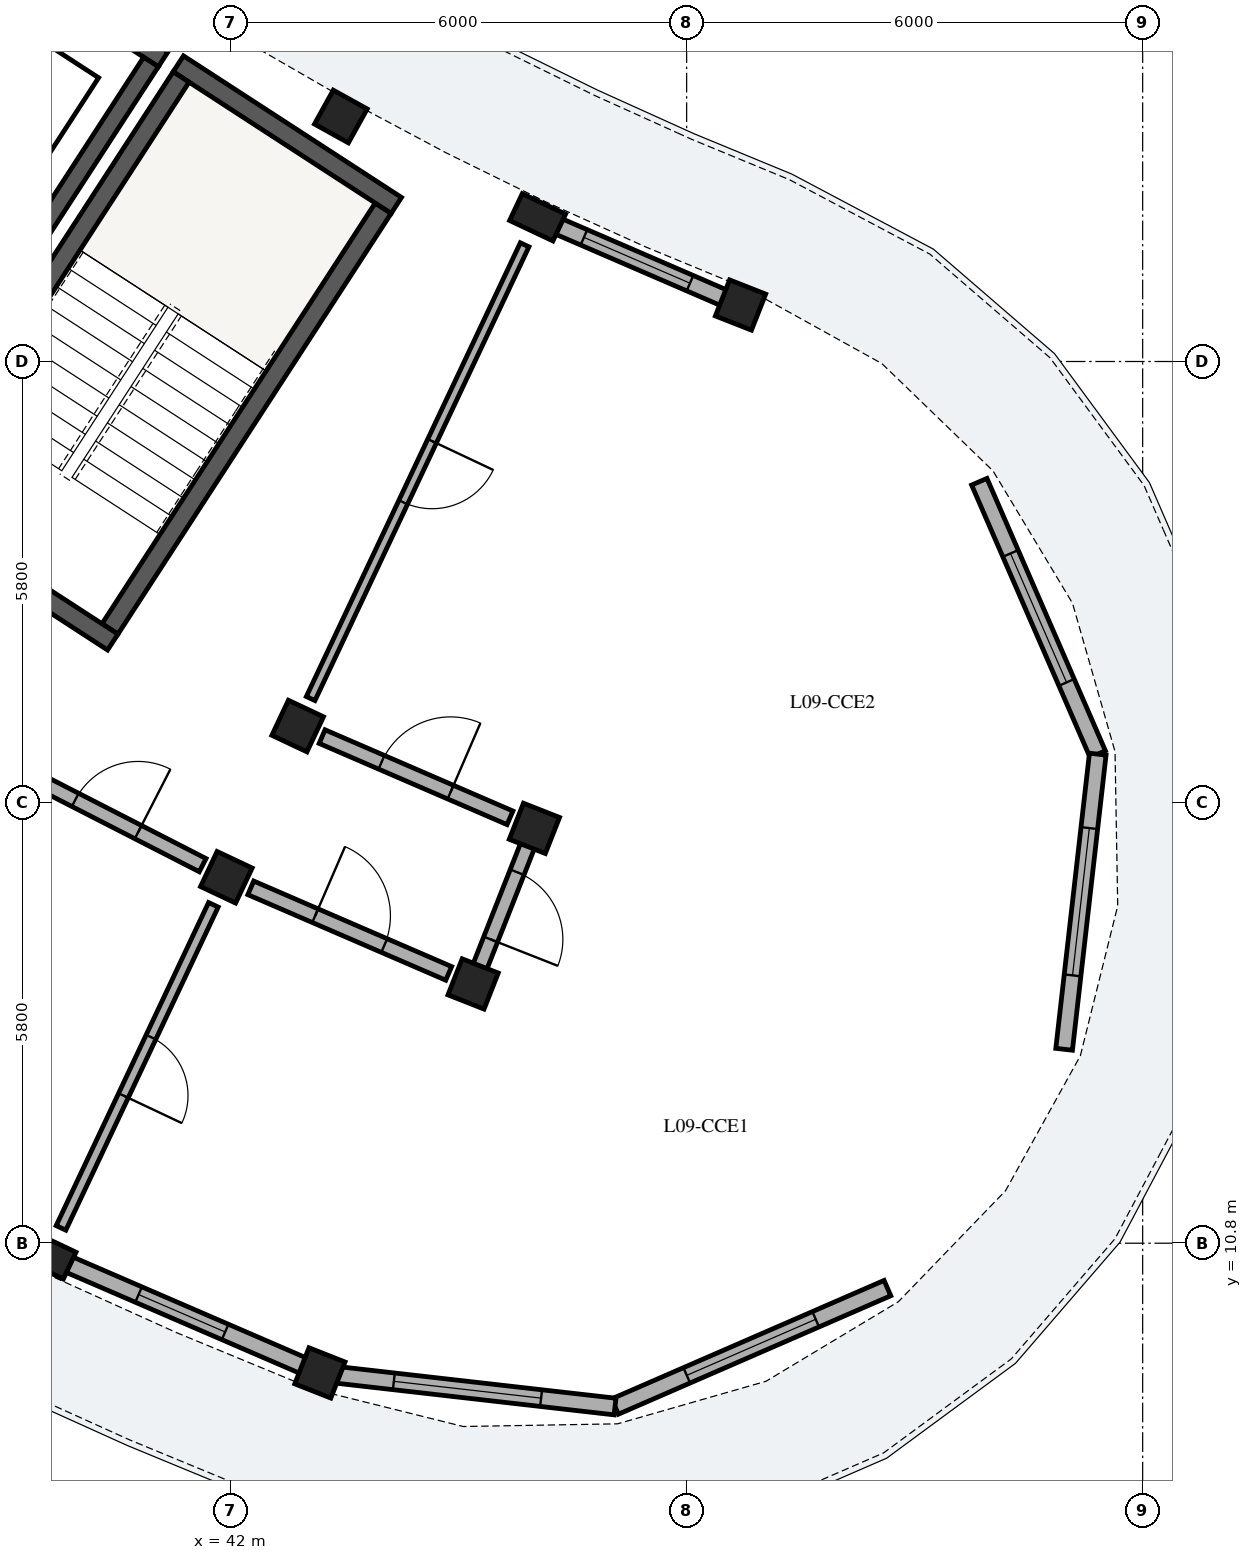
"""IFC4 building model, lengths in metres.
Left out: names, types, materials, properties, quantities, classifications, styles, units other than length and angle.
Written with IfcOpenShell. Run it as: python <this file> out.ifc"""

import sys

from ifc_helpers import new_model, si_unit, direction, frame, frame_2d, origin, origin_2d, place, context, subcontext, project, spatial, rectangle, extrude, element, fill, save


model = new_model("IFC4")
c1 = context("Model", 3, precision=1e-05, world=origin(), true_north=direction((0.0, 1.0)))
c2 = subcontext(c1, "Body", "Model", "MODEL_VIEW")
j1 = project(units=[si_unit("LENGTHUNIT", "METRE"), si_unit("PLANEANGLEUNIT", "RADIAN")], contexts=[c1])
p1 = place(None, origin())
s1 = spatial("IfcSite", under=j1, at=p1, CompositionType="ELEMENT")
p2 = place(p1, origin())
s2 = spatial("IfcBuilding", under=s1, at=p2, CompositionType="ELEMENT")
p3 = place(p2, frame((0.0, 0.0, 32.36)))
s3 = spatial("IfcBuildingStorey", under=s2, at=p3, CompositionType="ELEMENT", Elevation=32.36)
p4 = place(p3, frame((40.413, 18.882, 0.0), z_axis=(0.0, 0.0, 1.0), x_axis=(0.544629435258, 0.838676802022, 0.0)))
e1 = element("IfcWall", 1, at=p4, inside=s3, PredefinedType="SHEAR", context=c2, shape_type="SweptSolid", body=[
    extrude(rectangle(XDim=6.6, YDim=0.25, at=frame_2d((3.3, 0.0))), origin(), (0.0, 0.0, 1.0), 3.11),
])
p5 = place(p3, frame((44.18, 24.454, 0.0), z_axis=(0.0, 0.0, 1.0), x_axis=(-0.838699580527, 0.544594356953, 0.0)))
e2 = element("IfcWall", 2, at=p5, inside=s3, PredefinedType="SHEAR", context=c2, shape_type="SweptSolid", body=[
    extrude(rectangle(XDim=3.42, YDim=0.25, at=frame_2d((1.71, 0.0))), origin(), (0.0, 0.0, 1.0), 3.11),
])
p6 = place(p3, frame((40.449, 18.709, 0.0), z_axis=(0.0, 0.0, 1.0), x_axis=(-0.838678407117, 0.544626963559, 0.0)))
e3 = element("IfcWall", 3, at=p6, inside=s3, PredefinedType="SHEAR", context=c2, shape_type="SweptSolid", body=[
    extrude(rectangle(XDim=3.42, YDim=0.25, at=frame_2d((1.71, 0.0))), origin(), (0.0, 0.0, 1.0), 3.11),
])
p7 = place(p3, frame((37.754, 20.608, 0.0), z_axis=(0.0, 0.0, 1.0), x_axis=(0.544655453679, 0.838659905312, 0.0)))
e4 = element("IfcWall", 4, at=p7, inside=s3, PredefinedType="SHEAR", context=c2, shape_type="SweptSolid", body=[
    extrude(rectangle(XDim=6.6, YDim=0.25, at=frame_2d((3.3, 0.0))), origin(), (0.0, 0.0, 1.0), 3.11),
])
p8 = place(p7, frame((0.22, 0.0, 0.0)))
e5 = element("IfcOpeningElement", 5, at=p8, cuts=e4, PredefinedType="OPENING", context=c2, shape_type="SweptSolid", body=[
    extrude(rectangle(XDim=1.05, YDim=2.15, at=frame_2d((0.525, 1.075))), frame((0.0, 0.135, 0.0), z_axis=(0.0, -1.0, 0.0), x_axis=(1.0, 0.0, 0.0)), (0.0, 0.0, 1.0), 0.27),
])
p9 = place(p3, frame((41.112, 26.375, 0.0), z_axis=(0.0, 0.0, 1.0), x_axis=(-0.838638623546, 0.544688221919, 0.0)))
e6 = element("IfcWall", 6, at=p9, inside=s3, PredefinedType="SHEAR", context=c2, shape_type="SweptSolid", body=[
    extrude(rectangle(XDim=3.26, YDim=0.23, at=frame_2d((1.63, 0.0))), origin(), (0.0, 0.0, 1.0), 3.11),
])
p10 = place(p3, frame((39.482, 24.077, 0.0), z_axis=(0.0, 0.0, 1.0), x_axis=(0.544686387605, 0.838639814913, 0.0)))
e7 = element("IfcWall", 7, at=p10, inside=s3, PredefinedType="SHEAR", context=c2, shape_type="SweptSolid", body=[
    extrude(rectangle(XDim=2.7, YDim=0.23, at=frame_2d((1.35, 0.0))), origin(), (0.0, 0.0, 1.0), 3.11),
])
p11 = place(p3, frame((43.45, 25.623, 0.0), z_axis=(0.0, 0.0, 1.0), x_axis=(-0.484809620246, -0.874619707139, 0.0)))
e8 = element("IfcColumn", 8, at=p11, inside=s3, PredefinedType="COLUMN", context=c2, shape_type="SweptSolid", body=[
    extrude(rectangle(XDim=0.51, YDim=0.51, at=origin_2d()), origin(), (0.0, 0.0, 1.0), 3.115),
])
p12 = place(p3, frame((46.039, 24.297, 0.0), z_axis=(0.0, 0.0, 1.0), x_axis=(-0.426568739901, -0.904455145454, 0.0)))
e9 = element("IfcColumn", 9, at=p12, inside=s3, PredefinedType="PILASTER", context=c2, shape_type="SweptSolid", body=[
    extrude(rectangle(XDim=0.39, YDim=0.63, at=origin_2d()), origin(), (0.0, 0.0, 1.0), 3.115),
])
for number, where, z_axis, x_axis in (
    (10, (42.882, 17.604, 0.0), (0.0, 0.0, 1.0), (-0.427, -0.904, 0.0)),
    (11, (41.944, 15.614, 0.0), (0.0, 0.0, 1.0), (-0.427, -0.904, 0.0)),
):
    element("IfcColumn", number, at=place(p3, frame(where, z_axis=z_axis, x_axis=x_axis)), inside=s3, PredefinedType="COLUMN", context=c2, shape_type="SweptSolid", body=[
        extrude(rectangle(XDim=0.51, YDim=0.51, at=origin_2d()), origin(), (0.0, 0.0, 1.0), 3.115),
    ])
p13 = place(p3, frame((39.598, 10.64, 0.0), z_axis=(0.0, 0.0, 1.0), x_axis=(-0.426568739901, -0.904455145454, 0.0)))
e12 = element("IfcColumn", 12, at=p13, inside=s3, PredefinedType="PILASTER", context=c2, shape_type="SweptSolid", body=[
    extrude(rectangle(XDim=0.39, YDim=0.63, at=origin_2d()), origin(), (0.0, 0.0, 1.0), 3.115),
])
for number, where, z_axis, x_axis in (
    (13, (48.709, 23.143, 0.0), (0.0, 0.0, 1.0), (-0.367, -0.93, 0.0)),
    (14, (45.997, 16.258, 0.0), (0.0, 0.0, 1.0), (-0.367, -0.93, 0.0)),
    (15, (45.191, 14.211, 0.0), (0.0, 0.0, 1.0), (-0.367, -0.93, 0.0)),
    (16, (43.175, 9.094, 0.0), (0.0, 0.0, 1.0), (-0.367, -0.93, 0.0)),
):
    element("IfcColumn", number, at=place(p3, frame(where, z_axis=z_axis, x_axis=x_axis)), inside=s3, PredefinedType="COLUMN", context=c2, shape_type="SweptSolid", body=[
        extrude(rectangle(XDim=0.51, YDim=0.51, at=origin_2d()), origin(), (0.0, 0.0, 1.0), 3.115),
    ])
p14 = place(p3, frame((39.749, 10.574, 0.0), z_axis=(0.0, 0.0, 1.0), x_axis=(0.917923514364, -0.396757384024, 0.0)))
e17 = element("IfcWall", 17, at=p14, inside=s3, PredefinedType="SOLIDWALL", context=c2, shape_type="SweptSolid", body=[
    extrude(rectangle(XDim=3.507, YDim=0.22, at=frame_2d((1.753, 0.0))), origin(), (0.0, 0.0, 1.0), 2.355),
])
p15 = place(p14, frame((1.133, 0.0, 0.55)))
e18 = element("IfcOpeningElement", 18, at=p15, cuts=e17, PredefinedType="OPENING", context=c2, shape_type="SweptSolid", body=[
    extrude(rectangle(XDim=1.24, YDim=1.535, at=frame_2d((0.62, 0.768))), frame((0.0, 0.12, 0.0), z_axis=(0.0, -1.0, 0.0), x_axis=(1.0, 0.0, 0.0)), (0.0, 0.0, 1.0), 0.24),
])
p16 = place(p3, frame((46.19, 24.231, 0.0), z_axis=(0.0, 0.0, 1.0), x_axis=(0.917932416464, -0.396736787813, 0.0)))
e19 = element("IfcWall", 19, at=p16, inside=s3, PredefinedType="SOLIDWALL", context=c2, shape_type="SweptSolid", body=[
    extrude(rectangle(XDim=2.519, YDim=0.22, at=frame_2d((1.259, 0.0))), origin(), (0.0, 0.0, 1.0), 2.355),
])
p17 = place(p16, frame((0.5, 0.0, 0.55)))
e20 = element("IfcOpeningElement", 20, at=p17, cuts=e19, PredefinedType="OPENING", context=c2, shape_type="SweptSolid", body=[
    extrude(rectangle(XDim=1.52, YDim=1.485, at=frame_2d((0.76, 0.743))), frame((0.0, 0.12, 0.0), z_axis=(0.0, -1.0, 0.0), x_axis=(1.0, 0.0, 0.0)), (0.0, 0.0, 1.0), 0.24),
])
p18 = place(p3, frame((51.851, 20.818, 0.0), z_axis=(0.0, 0.0, 1.0), x_axis=(0.398723827264, -0.917071049359, 0.0)))
e21 = element("IfcWall", 21, at=p18, inside=s3, PredefinedType="SOLIDWALL", context=c2, shape_type="SweptSolid", body=[
    extrude(rectangle(XDim=3.908, YDim=0.22, at=frame_2d((1.954, 0.0))), origin(), (0.0, 0.0, 1.0), 2.355),
])
p19 = place(p18, frame((1.029, 0.0, 0.4)))
e22 = element("IfcOpeningElement", 22, at=p19, cuts=e21, PredefinedType="OPENING", context=c2, shape_type="SweptSolid", body=[
    extrude(rectangle(XDim=1.85, YDim=1.72, at=frame_2d((0.925, 0.86))), frame((0.0, 0.12, 0.0), z_axis=(0.0, -1.0, 0.0), x_axis=(1.0, 0.0, 0.0)), (0.0, 0.0, 1.0), 0.24),
])
p20 = place(p3, frame((53.409, 17.234, 0.0), z_axis=(0.0, 0.0, 1.0), x_axis=(-0.113201245525, -0.993572079928, 0.0)))
e23 = element("IfcWall", 23, at=p20, inside=s3, PredefinedType="SOLIDWALL", context=c2, shape_type="SweptSolid", body=[
    extrude(rectangle(XDim=3.908, YDim=0.22, at=frame_2d((1.954, 0.0))), origin(), (0.0, 0.0, 1.0), 2.355),
])
p21 = place(p20, frame((0.979, 0.0, 0.4)))
e24 = element("IfcOpeningElement", 24, at=p21, cuts=e23, PredefinedType="OPENING", context=c2, shape_type="SweptSolid", body=[
    extrude(rectangle(XDim=1.95, YDim=1.78, at=frame_2d((0.975, 0.89))), frame((0.0, 0.12, 0.0), z_axis=(0.0, -1.0, 0.0), x_axis=(1.0, 0.0, 0.0)), (0.0, 0.0, 1.0), 0.24),
])
p22 = place(p3, frame((50.642, 10.209, 0.0), z_axis=(0.0, 0.0, 1.0), x_axis=(-0.917061117534, -0.398746669838, 0.0)))
e25 = element("IfcWall", 25, at=p22, inside=s3, PredefinedType="SOLIDWALL", context=c2, shape_type="SweptSolid", body=[
    extrude(rectangle(XDim=3.908, YDim=0.22, at=frame_2d((1.954, 0.0))), origin(), (0.0, 0.0, 1.0), 2.355),
])
p23 = place(p22, frame((1.029, 0.0, 0.4)))
e26 = element("IfcOpeningElement", 26, at=p23, cuts=e25, PredefinedType="OPENING", context=c2, shape_type="SweptSolid", body=[
    extrude(rectangle(XDim=1.85, YDim=1.72, at=frame_2d((0.925, 0.86))), frame((0.0, 0.12, 0.0), z_axis=(0.0, -1.0, 0.0), x_axis=(1.0, 0.0, 0.0)), (0.0, 0.0, 1.0), 0.24),
])
p24 = place(p3, frame((47.058, 8.651, 0.0), z_axis=(0.0, 0.0, 1.0), x_axis=(-0.993565852845, 0.113255887533, 0.0)))
e27 = element("IfcWall", 27, at=p24, inside=s3, PredefinedType="SOLIDWALL", context=c2, shape_type="SweptSolid", body=[
    extrude(rectangle(XDim=3.908, YDim=0.22, at=frame_2d((1.954, 0.0))), origin(), (0.0, 0.0, 1.0), 2.355),
])
p25 = place(p24, frame((0.979, 0.0, 0.4)))
e28 = element("IfcOpeningElement", 28, at=p25, cuts=e27, PredefinedType="OPENING", context=c2, shape_type="SweptSolid", body=[
    extrude(rectangle(XDim=1.95, YDim=1.78, at=frame_2d((0.975, 0.89))), frame((0.0, 0.12, 0.0), z_axis=(0.0, -1.0, 0.0), x_axis=(1.0, 0.0, 0.0)), (0.0, 0.0, 1.0), 0.24),
])
p26 = place(p3, frame((39.107, 17.067, 0.0), z_axis=(0.0, 0.0, 1.0), x_axis=(0.890030590607, -0.45590080915, 0.0)))
e29 = element("IfcWall", 29, at=p26, inside=s3, PredefinedType="PARTITIONING", context=c2, shape_type="SweptSolid", body=[
    extrude(rectangle(XDim=2.837, YDim=0.195, at=frame_2d((1.418, 0.0))), origin(), (0.0, 0.0, 1.0), 2.37),
])
p27 = place(p26, frame((0.954, 0.0, 0.0)))
e30 = element("IfcOpeningElement", 30, at=p27, cuts=e29, PredefinedType="OPENING", context=c2, shape_type="SweptSolid", body=[
    extrude(rectangle(XDim=0.93, YDim=2.12, at=frame_2d((0.465, 1.06))), frame((0.0, 0.107, 0.0), z_axis=(0.0, -1.0, 0.0), x_axis=(1.0, 0.0, 0.0)), (0.0, 0.0, 1.0), 0.215),
])
p28 = place(p3, frame((41.773, 15.252, 0.0), z_axis=(0.0, 0.0, 1.0), x_axis=(-0.426567365945, -0.904455793453, 0.0)))
e31 = element("IfcWall", 31, at=p28, inside=s3, PredefinedType="PLUMBINGWALL", context=c2, shape_type="SweptSolid", body=[
    extrude(rectangle(XDim=4.7, YDim=0.14, at=frame_2d((2.35, 0.0))), origin(), (0.0, 0.0, 1.0), 2.37),
])
p29 = place(p28, frame((1.925, 0.0, 0.0)))
e32 = element("IfcOpeningElement", 32, at=p29, cuts=e31, PredefinedType="OPENING", context=c2, shape_type="SweptSolid", body=[
    extrude(rectangle(XDim=0.85, YDim=2.05, at=frame_2d((0.425, 1.025))), frame((0.0, 0.08, 0.0), z_axis=(0.0, -1.0, 0.0), x_axis=(1.0, 0.0, 0.0)), (0.0, 0.0, 1.0), 0.16),
])
p30 = place(p3, frame((45.868, 23.935, 0.0), z_axis=(0.0, 0.0, 1.0), x_axis=(-0.426573573579, -0.904452865728, 0.0)))
e33 = element("IfcWall", 33, at=p30, inside=s3, PredefinedType="PARTITIONING", context=c2, shape_type="SweptSolid", body=[
    extrude(rectangle(XDim=6.6, YDim=0.125, at=frame_2d((3.3, 0.0))), origin(), (0.0, 0.0, 1.0), 2.37),
])
p31 = place(p30, frame((2.855, 0.0, 0.0)))
e34 = element("IfcOpeningElement", 34, at=p31, cuts=e33, PredefinedType="OPENING", context=c2, shape_type="SweptSolid", body=[
    extrude(rectangle(XDim=0.89, YDim=2.1, at=frame_2d((0.445, 1.05))), frame((0.0, 0.073, 0.0), z_axis=(0.0, -1.0, 0.0), x_axis=(1.0, 0.0, 0.0)), (0.0, 0.0, 1.0), 0.145),
])
p32 = place(p3, frame((42.265, 15.475, 0.0), z_axis=(0.0, 0.0, 1.0), x_axis=(0.917943439406, -0.396711282991, 0.0)))
e35 = element("IfcWall", 35, at=p32, inside=s3, PredefinedType="PARTITIONING", context=c2, shape_type="SweptSolid", body=[
    extrude(rectangle(XDim=2.837, YDim=0.195, at=frame_2d((1.418, 0.0))), origin(), (0.0, 0.0, 1.0), 2.37),
])
p33 = place(p32, frame((0.924, 0.0, 0.0)))
e36 = element("IfcOpeningElement", 36, at=p33, cuts=e35, PredefinedType="OPENING", context=c2, shape_type="SweptSolid", body=[
    extrude(rectangle(XDim=0.99, YDim=2.16, at=frame_2d((0.495, 1.08))), frame((0.0, 0.107, 0.0), z_axis=(0.0, -1.0, 0.0), x_axis=(1.0, 0.0, 0.0)), (0.0, 0.0, 1.0), 0.215),
])
p34 = place(p3, frame((43.204, 17.465, 0.0), z_axis=(0.0, 0.0, 1.0), x_axis=(0.91793557165, -0.39672948756, 0.0)))
e37 = element("IfcWall", 37, at=p34, inside=s3, PredefinedType="PARTITIONING", context=c2, shape_type="SweptSolid", body=[
    extrude(rectangle(XDim=2.693, YDim=0.195, at=frame_2d((1.346, 0.0))), origin(), (0.0, 0.0, 1.0), 2.37),
])
p35 = place(p34, frame((0.852, 0.0, 0.0)))
e38 = element("IfcOpeningElement", 38, at=p35, cuts=e37, PredefinedType="OPENING", context=c2, shape_type="SweptSolid", body=[
    extrude(rectangle(XDim=0.99, YDim=2.16, at=frame_2d((0.495, 1.08))), frame((0.0, 0.107, 0.0), z_axis=(0.0, -1.0, 0.0), x_axis=(1.0, 0.0, 0.0)), (0.0, 0.0, 1.0), 0.215),
])
p36 = place(p3, frame((45.979, 16.211, 0.0), z_axis=(0.0, 0.0, 1.0), x_axis=(-0.366454372645, -0.930436022932, 0.0)))
e39 = element("IfcWall", 39, at=p36, inside=s3, PredefinedType="PARTITIONING", context=c2, shape_type="SweptSolid", body=[
    extrude(rectangle(XDim=2.1, YDim=0.195, at=frame_2d((1.05, 0.0))), origin(), (0.0, 0.0, 1.0), 2.37),
])
p37 = place(p36, frame((0.57, 0.0, 0.0)))
e40 = element("IfcOpeningElement", 40, at=p37, cuts=e39, PredefinedType="OPENING", context=c2, shape_type="SweptSolid", body=[
    extrude(rectangle(XDim=0.95, YDim=2.13, at=frame_2d((0.475, 1.065))), frame((0.0, 0.107, 0.0), z_axis=(0.0, -1.0, 0.0), x_axis=(1.0, 0.0, 0.0)), (0.0, 0.0, 1.0), 0.215),
])
p38 = place(p15, origin())
e41 = element("IfcWindow", 41, at=p38, inside=s3, PartitioningType="SINGLE_PANEL", PredefinedType="WINDOW", context=c2, shape_type="SweptSolid", body=[
    extrude(rectangle(XDim=1.24, YDim=1.535, at=frame_2d((0.62, 0.768))), frame((0.0, 0.03, 0.0), z_axis=(0.0, -1.0, 0.0), x_axis=(1.0, 0.0, 0.0)), (0.0, 0.0, 1.0), 0.06),
])
fill(e18, e41)
p39 = place(p17, origin())
e42 = element("IfcWindow", 42, at=p39, inside=s3, PartitioningType="SINGLE_PANEL", PredefinedType="WINDOW", context=c2, shape_type="SweptSolid", body=[
    extrude(rectangle(XDim=1.52, YDim=1.485, at=frame_2d((0.76, 0.743))), frame((0.0, 0.03, 0.0), z_axis=(0.0, -1.0, 0.0), x_axis=(1.0, 0.0, 0.0)), (0.0, 0.0, 1.0), 0.06),
])
fill(e20, e42)
p40 = place(p19, origin())
e43 = element("IfcWindow", 43, at=p40, inside=s3, PartitioningType="SINGLE_PANEL", PredefinedType="WINDOW", context=c2, shape_type="SweptSolid", body=[
    extrude(rectangle(XDim=1.85, YDim=1.72, at=frame_2d((0.925, 0.86))), frame((0.0, 0.03, 0.0), z_axis=(0.0, -1.0, 0.0), x_axis=(1.0, 0.0, 0.0)), (0.0, 0.0, 1.0), 0.06),
])
fill(e22, e43)
p41 = place(p21, origin())
e44 = element("IfcWindow", 44, at=p41, inside=s3, PartitioningType="SINGLE_PANEL", PredefinedType="WINDOW", context=c2, shape_type="SweptSolid", body=[
    extrude(rectangle(XDim=1.95, YDim=1.78, at=frame_2d((0.975, 0.89))), frame((0.0, 0.03, 0.0), z_axis=(0.0, -1.0, 0.0), x_axis=(1.0, 0.0, 0.0)), (0.0, 0.0, 1.0), 0.06),
])
fill(e24, e44)
p42 = place(p23, origin())
e45 = element("IfcWindow", 45, at=p42, inside=s3, PartitioningType="SINGLE_PANEL", PredefinedType="WINDOW", context=c2, shape_type="SweptSolid", body=[
    extrude(rectangle(XDim=1.85, YDim=1.72, at=frame_2d((0.925, 0.86))), frame((0.0, 0.03, 0.0), z_axis=(0.0, -1.0, 0.0), x_axis=(1.0, 0.0, 0.0)), (0.0, 0.0, 1.0), 0.06),
])
fill(e26, e45)
p43 = place(p25, origin())
e46 = element("IfcWindow", 46, at=p43, inside=s3, PartitioningType="SINGLE_PANEL", PredefinedType="WINDOW", context=c2, shape_type="SweptSolid", body=[
    extrude(rectangle(XDim=1.95, YDim=1.78, at=frame_2d((0.975, 0.89))), frame((0.0, 0.03, 0.0), z_axis=(0.0, -1.0, 0.0), x_axis=(1.0, 0.0, 0.0)), (0.0, 0.0, 1.0), 0.06),
])
fill(e28, e46)
p44 = place(p27, origin())
e47 = element("IfcDoor", 47, at=p44, inside=s3, OperationType="SINGLE_SWING_RIGHT", PredefinedType="DOOR", context=c2, shape_type="SweptSolid", body=[
    extrude(rectangle(XDim=0.93, YDim=2.12, at=frame_2d((0.465, 1.06))), frame((0.0, 0.025, 0.0), z_axis=(0.0, -1.0, 0.0), x_axis=(1.0, 0.0, 0.0)), (0.0, 0.0, 1.0), 0.05),
])
fill(e30, e47)
p45 = place(p29, origin())
e48 = element("IfcDoor", 48, at=p45, inside=s3, OperationType="SINGLE_SWING_RIGHT", PredefinedType="DOOR", context=c2, shape_type="SweptSolid", body=[
    extrude(rectangle(XDim=0.85, YDim=2.05, at=frame_2d((0.425, 1.025))), frame((0.0, 0.025, 0.0), z_axis=(0.0, -1.0, 0.0), x_axis=(1.0, 0.0, 0.0)), (0.0, 0.0, 1.0), 0.05),
])
fill(e32, e48)
p46 = place(p31, origin())
e49 = element("IfcDoor", 49, at=p46, inside=s3, OperationType="SINGLE_SWING_LEFT", PredefinedType="DOOR", context=c2, shape_type="SweptSolid", body=[
    extrude(rectangle(XDim=0.89, YDim=2.1, at=frame_2d((0.445, 1.05))), frame((0.0, 0.025, 0.0), z_axis=(0.0, -1.0, 0.0), x_axis=(1.0, 0.0, 0.0)), (0.0, 0.0, 1.0), 0.05),
])
fill(e34, e49)
p47 = place(p33, origin())
e50 = element("IfcDoor", 50, at=p47, inside=s3, OperationType="SINGLE_SWING_LEFT", PredefinedType="DOOR", context=c2, shape_type="SweptSolid", body=[
    extrude(rectangle(XDim=0.99, YDim=2.16, at=frame_2d((0.495, 1.08))), frame((0.0, 0.025, 0.0), z_axis=(0.0, -1.0, 0.0), x_axis=(1.0, 0.0, 0.0)), (0.0, 0.0, 1.0), 0.05),
])
fill(e36, e50)
p48 = place(p35, origin())
e51 = element("IfcDoor", 51, at=p48, inside=s3, OperationType="SINGLE_SWING_RIGHT", PredefinedType="DOOR", context=c2, shape_type="SweptSolid", body=[
    extrude(rectangle(XDim=0.99, YDim=2.16, at=frame_2d((0.495, 1.08))), frame((0.0, 0.025, 0.0), z_axis=(0.0, -1.0, 0.0), x_axis=(1.0, 0.0, 0.0)), (0.0, 0.0, 1.0), 0.05),
])
fill(e38, e51)
p49 = place(p37, origin())
e52 = element("IfcDoor", 52, at=p49, inside=s3, OperationType="SINGLE_SWING_RIGHT", PredefinedType="DOOR", context=c2, shape_type="SweptSolid", body=[
    extrude(rectangle(XDim=0.95, YDim=2.13, at=frame_2d((0.475, 1.065))), frame((0.0, 0.025, 0.0), z_axis=(0.0, -1.0, 0.0), x_axis=(1.0, 0.0, 0.0)), (0.0, 0.0, 1.0), 0.05),
])
fill(e40, e52)
save(model, sys.argv[1])
